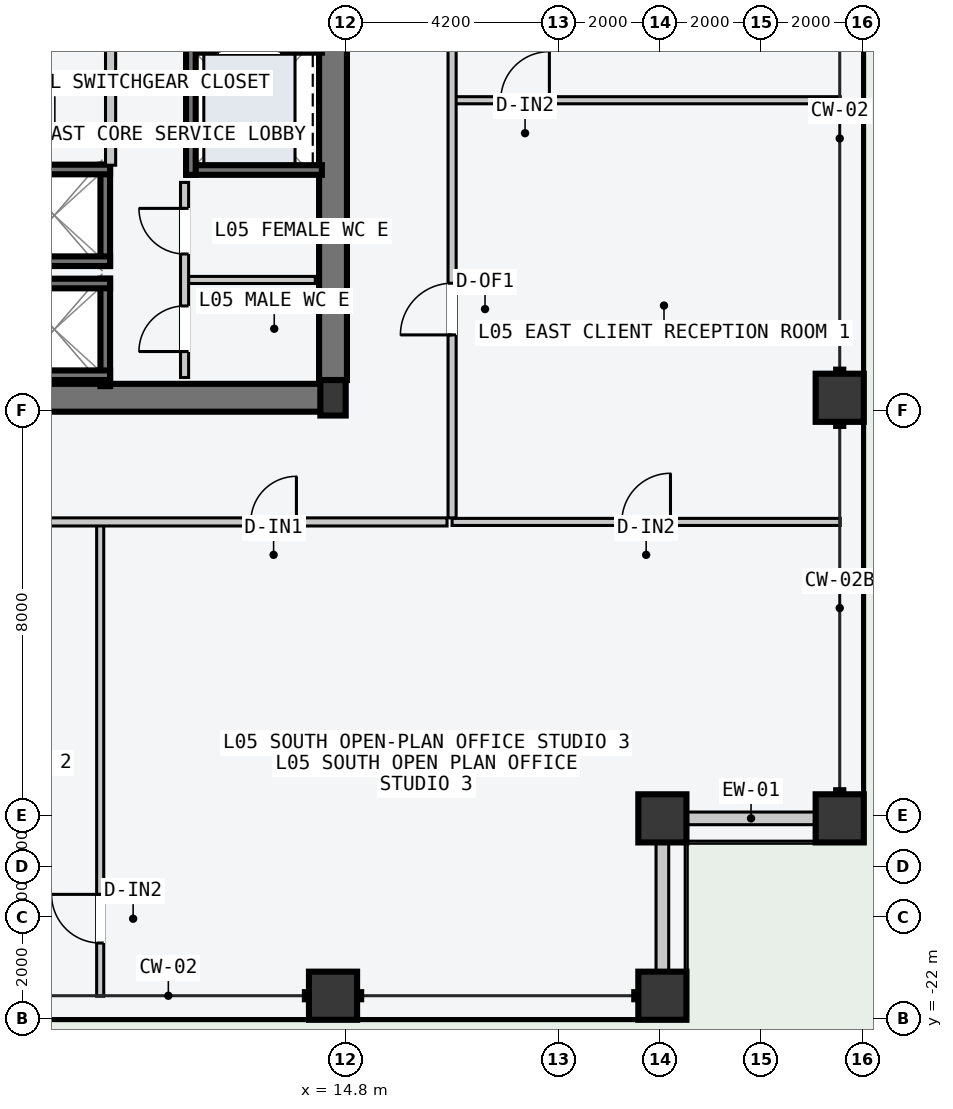
"""IFC4 building model, lengths in metres.
Left out: names, types, materials, properties, quantities, classifications, styles, units other than length and angle.
Written with IfcOpenShell. Run it as: python <this file> out.ifc"""

import sys

from ifc_helpers import new_model, si_unit, direction, frame, frame_2d, origin, origin_2d, place, context, subcontext, project, spatial, rectangle, hollow_rectangle, i_section, extrude, element, fill, save


model = new_model("IFC4")
c1 = context("Model", 3, precision=1e-05, world=origin(), true_north=direction((0.0, 1.0)))
c2 = subcontext(c1, "Body", "Model", "MODEL_VIEW")
j1 = project(units=[si_unit("LENGTHUNIT", "METRE"), si_unit("PLANEANGLEUNIT", "RADIAN")], contexts=[c1])
p1 = place(None, origin())
s1 = spatial("IfcSite", under=j1, at=p1, CompositionType="ELEMENT")
p2 = place(p1, origin())
s2 = spatial("IfcBuilding", under=s1, at=p2, CompositionType="ELEMENT")
p3 = place(p2, frame((0.0, 0.0, 24.0)))
s3 = spatial("IfcBuildingStorey", under=s2, at=p3, CompositionType="ELEMENT", Elevation=24.0)
p4 = place(p3, frame((8.07, -9.75, -0.2), z_axis=(0.0, 0.0, 1.0), x_axis=(1.0, 0.0, 0.0)))
e1 = element("IfcWall", 1, at=p4, inside=s3, PredefinedType="SHEAR", context=c2, shape_type="SweptSolid", body=[
    extrude(rectangle(XDim=6.46, YDim=0.55, at=frame_2d((3.23, 0.0))), origin(), (0.0, 0.0, 1.0), 3.6),
])
p5 = place(p3, frame((14.55, -9.4, -0.2), z_axis=(0.0, 0.0, 1.0), x_axis=(0.0, 1.0, 0.0)))
e2 = element("IfcWall", 2, at=p5, inside=s3, PredefinedType="SHEAR", context=c2, shape_type="SweptSolid", body=[
    extrude(rectangle(XDim=9.05, YDim=0.55, at=frame_2d((4.525, 0.0))), origin(), (0.0, 0.0, 1.0), 3.6),
])
p6 = place(p3, frame((14.55, -9.75, 0.0), z_axis=(0.0, 0.0, 1.0), x_axis=(1.0, 0.0, 0.0)))
e3 = element("IfcColumn", 3, at=p6, inside=s3, PredefinedType="COLUMN", context=c2, shape_type="SweptSolid", body=[
    extrude(i_section(OverallWidth=0.5, OverallDepth=0.7, WebThickness=0.028, FlangeThickness=0.045, at=origin_2d()), origin(), (0.0, 0.0, 1.0), 3.6),
])
for number, where, z_axis, x_axis in (
    (4, (14.55, -21.55, -0.2), (0.0, 0.0, 1.0), (1.0, 0.0, 0.0)),
    (5, (21.05, -21.55, -0.2), (0.0, 0.0, 1.0), (1.0, 0.0, 0.0)),
    (6, (24.55, -18.05, -0.2), (0.0, 0.0, 1.0), (0.0, 1.0, 0.0)),
    (7, (24.55, -9.75, -0.2), (0.0, 0.0, 1.0), (0.0, 1.0, 0.0)),
):
    element("IfcColumn", number, at=place(p3, frame(where, z_axis=z_axis, x_axis=x_axis)), inside=s3, PredefinedType="COLUMN", context=c2, shape_type="SweptSolid", body=[
        extrude(hollow_rectangle(XDim=0.95, YDim=0.95, WallThickness=0.048, at=origin_2d()), origin(), (0.0, 0.0, 1.0), 3.8),
    ])
p7 = place(p3, frame((21.05, -18.05, 0.0), z_axis=(0.0, 0.0, 1.0), x_axis=(1.0, 0.0, 0.0)))
e8 = element("IfcColumn", 8, at=p7, inside=s3, PredefinedType="COLUMN", context=c2, shape_type="SweptSolid", body=[
    extrude(hollow_rectangle(XDim=0.95, YDim=0.95, WallThickness=0.048, at=origin_2d()), origin(), (0.0, 0.0, 1.0), 3.6),
])
for number, where, z_axis, x_axis in (
    (9, (21.535, -18.05, 0.0), (0.0, 0.0, 1.0), (1.0, 0.0, 0.0)),
    (10, (21.05, -21.065, 0.0), (0.0, 0.0, 1.0), (0.0, 1.0, 0.0)),
):
    element("IfcWall", number, at=place(p3, frame(where, z_axis=z_axis, x_axis=x_axis)), inside=s3, PredefinedType="STANDARD", context=c2, shape_type="SweptSolid", body=[
        extrude(rectangle(XDim=2.53, YDim=0.25, at=frame_2d((1.265, 0.0))), origin(), (0.0, 0.0, 1.0), 2.7),
    ])
p8 = place(p3, frame((10.055, -9.52, -0.2), z_axis=(0.0, 0.0, 1.0), x_axis=(0.0, 1.0, 0.0)))
e11 = element("IfcWall", 11, at=p8, inside=s3, PredefinedType="SOLIDWALL", context=c2, shape_type="SweptSolid", body=[
    extrude(rectangle(XDim=2.12, YDim=0.19, at=frame_2d((1.06, 0.0))), origin(), (0.0, 0.0, 1.0), 3.6),
])
for number, where, z_axis, x_axis in (
    (12, (7.95, -7.495, -0.2), (0.0, 0.0, 1.0), (1.0, 0.0, 0.0)),
    (13, (7.95, -9.305, -0.2), (0.0, 0.0, 1.0), (1.0, 0.0, 0.0)),
):
    element("IfcWall", number, at=place(p3, frame(where, z_axis=z_axis, x_axis=x_axis)), inside=s3, PredefinedType="SOLIDWALL", context=c2, shape_type="SweptSolid", body=[
        extrude(rectangle(XDim=2.2, YDim=0.19, at=frame_2d((1.1, 0.0))), origin(), (0.0, 0.0, 1.0), 3.6),
    ])
p9 = place(p3, frame((10.055, -7.15, -0.2), z_axis=(0.0, 0.0, 1.0), x_axis=(0.0, 1.0, 0.0)))
e14 = element("IfcWall", 14, at=p9, inside=s3, PredefinedType="SOLIDWALL", context=c2, shape_type="SweptSolid", body=[
    extrude(rectangle(XDim=2.0, YDim=0.19, at=frame_2d((1.0, 0.0))), origin(), (0.0, 0.0, 1.0), 3.6),
])
for number, where, z_axis, x_axis in (
    (15, (7.95, -5.245, -0.2), (0.0, 0.0, 1.0), (1.0, 0.0, 0.0)),
    (16, (7.95, -7.055, -0.2), (0.0, 0.0, 1.0), (1.0, 0.0, 0.0)),
):
    element("IfcWall", number, at=place(p3, frame(where, z_axis=z_axis, x_axis=x_axis)), inside=s3, PredefinedType="SOLIDWALL", context=c2, shape_type="SweptSolid", body=[
        extrude(rectangle(XDim=2.2, YDim=0.19, at=frame_2d((1.1, 0.0))), origin(), (0.0, 0.0, 1.0), 3.6),
    ])
p10 = place(p3, frame((11.65, -2.845, -0.2), z_axis=(0.0, 0.0, 1.0), x_axis=(1.0, 0.0, 0.0)))
e17 = element("IfcWall", 17, at=p10, inside=s3, PredefinedType="SOLIDWALL", context=c2, shape_type="SweptSolid", body=[
    extrude(rectangle(XDim=2.68, YDim=0.19, at=frame_2d((1.34, 0.0))), origin(), (0.0, 0.0, 1.0), 3.6),
])
p11 = place(p10, frame((0.65, 0.0, 0.2)))
e18 = element("IfcOpeningElement", 18, at=p11, cuts=e17, PredefinedType="OPENING", context=c2, shape_type="SweptSolid", body=[
    extrude(rectangle(XDim=1.2, YDim=2.2, at=frame_2d((0.6, 1.1))), frame((0.0, 0.105, 0.0), z_axis=(0.0, -1.0, 0.0), x_axis=(1.0, 0.0, 0.0)), (0.0, 0.0, 1.0), 0.21),
])
p12 = place(p3, frame((11.65, -5.255, -0.2), z_axis=(0.0, 0.0, 1.0), x_axis=(1.0, 0.0, 0.0)))
e19 = element("IfcWall", 19, at=p12, inside=s3, PredefinedType="SOLIDWALL", context=c2, shape_type="SweptSolid", body=[
    extrude(rectangle(XDim=2.68, YDim=0.19, at=frame_2d((1.34, 0.0))), origin(), (0.0, 0.0, 1.0), 3.6),
])
p13 = place(p3, frame((11.745, -5.35, -0.2), z_axis=(0.0, 0.0, 1.0), x_axis=(0.0, 1.0, 0.0)))
e20 = element("IfcWall", 20, at=p13, inside=s3, PredefinedType="SOLIDWALL", context=c2, shape_type="SweptSolid", body=[
    extrude(rectangle(XDim=2.6, YDim=0.19, at=frame_2d((1.3, 0.0))), origin(), (0.0, 0.0, 1.0), 3.6),
])
p14 = place(p3, frame((10.16, -5.16, 0.0), z_axis=(0.0, 0.0, 1.0), x_axis=(0.0, 1.0, 0.0)))
e21 = element("IfcWall", 21, at=p14, inside=s3, PredefinedType="PARTITIONING", context=c2, shape_type="SweptSolid", body=[
    extrude(rectangle(XDim=2.44, YDim=0.2, at=frame_2d((1.22, 0.0))), origin(), (0.0, 0.0, 1.0), 3.4),
])
p15 = place(p3, frame((11.7, -7.425, 0.0), z_axis=(0.0, 0.0, 1.0), x_axis=(1.0, 0.0, 0.0)))
e22 = element("IfcWall", 22, at=p15, inside=s3, PredefinedType="PARTITIONING", context=c2, shape_type="SweptSolid", body=[
    extrude(rectangle(XDim=2.5, YDim=0.14, at=frame_2d((1.25, 0.0))), origin(), (0.0, 0.0, 1.0), 3.4),
])
p16 = place(p3, frame((11.62, -9.35, 0.0), z_axis=(0.0, 0.0, 1.0), x_axis=(0.0, 1.0, 0.0)))
e23 = element("IfcWall", 23, at=p16, inside=s3, PredefinedType="PARTITIONING", context=c2, shape_type="SweptSolid", body=[
    extrude(rectangle(XDim=3.85, YDim=0.16, at=frame_2d((1.925, 0.0))), origin(), (0.0, 0.0, 1.0), 3.4),
])
p17 = place(p16, frame((0.512, 0.0, 0.0)))
e24 = element("IfcOpeningElement", 24, at=p17, cuts=e23, PredefinedType="OPENING", context=c2, shape_type="SweptSolid", body=[
    extrude(rectangle(XDim=0.9, YDim=2.15, at=frame_2d((0.45, 1.075))), frame((0.0, 0.09, 0.0), z_axis=(0.0, -1.0, 0.0), x_axis=(1.0, 0.0, 0.0)), (0.0, 0.0, 1.0), 0.18),
])
p18 = place(p16, frame((2.438, 0.0, 0.0)))
e25 = element("IfcOpeningElement", 25, at=p18, cuts=e23, PredefinedType="OPENING", context=c2, shape_type="SweptSolid", body=[
    extrude(rectangle(XDim=0.9, YDim=2.15, at=frame_2d((0.45, 1.075))), frame((0.0, 0.09, 0.0), z_axis=(0.0, -1.0, 0.0), x_axis=(1.0, 0.0, 0.0)), (0.0, 0.0, 1.0), 0.18),
])
p19 = place(p3, frame((9.955, -21.56, 0.0), z_axis=(0.0, 0.0, 1.0), x_axis=(0.0, 1.0, 0.0)))
e26 = element("IfcWall", 26, at=p19, inside=s3, PredefinedType="PARTITIONING", context=c2, shape_type="SweptSolid", body=[
    extrude(rectangle(XDim=9.3, YDim=0.14, at=frame_2d((4.65, 0.0))), origin(), (0.0, 0.0, 1.0), 3.4),
])
p20 = place(p19, frame((1.05, 0.0, 0.0)))
e27 = element("IfcOpeningElement", 27, at=p20, cuts=e26, PredefinedType="OPENING", context=c2, shape_type="SweptSolid", body=[
    extrude(rectangle(XDim=0.96, YDim=2.18, at=frame_2d((0.48, 1.09))), frame((0.0, 0.08, 0.0), z_axis=(0.0, -1.0, 0.0), x_axis=(1.0, 0.0, 0.0)), (0.0, 0.0, 1.0), 0.16),
])
p21 = place(p3, frame((-16.8, -12.2, 0.0), z_axis=(0.0, 0.0, 1.0), x_axis=(1.0, 0.0, 0.0)))
e28 = element("IfcWall", 28, at=p21, inside=s3, PredefinedType="PARTITIONING", context=c2, shape_type="SweptSolid", body=[
    extrude(rectangle(XDim=33.6, YDim=0.16, at=frame_2d((16.8, 0.0))), origin(), (0.0, 0.0, 1.0), 3.4),
])
p22 = place(p21, frame((6.585, 0.0, 0.0)))
e29 = element("IfcOpeningElement", 29, at=p22, cuts=e28, PredefinedType="OPENING", context=c2, shape_type="SweptSolid", body=[
    extrude(rectangle(XDim=1.24, YDim=2.24, at=frame_2d((0.62, 1.12))), frame((0.0, 0.09, 0.0), z_axis=(0.0, -1.0, 0.0), x_axis=(1.0, 0.0, 0.0)), (0.0, 0.0, 1.0), 0.18),
])
p23 = place(p21, frame((19.883, 0.0, 0.0)))
e30 = element("IfcOpeningElement", 30, at=p23, cuts=e28, PredefinedType="OPENING", context=c2, shape_type="SweptSolid", body=[
    extrude(rectangle(XDim=1.4, YDim=2.2, at=frame_2d((0.7, 1.1))), frame((0.0, 0.09, 0.0), z_axis=(0.0, -1.0, 0.0), x_axis=(1.0, 0.0, 0.0)), (0.0, 0.0, 1.0), 0.18),
])
p24 = place(p21, frame((29.728, 0.0, 0.0)))
e31 = element("IfcOpeningElement", 31, at=p24, cuts=e28, PredefinedType="OPENING", context=c2, shape_type="SweptSolid", body=[
    extrude(rectangle(XDim=0.9, YDim=2.15, at=frame_2d((0.45, 1.075))), frame((0.0, 0.09, 0.0), z_axis=(0.0, -1.0, 0.0), x_axis=(1.0, 0.0, 0.0)), (0.0, 0.0, 1.0), 0.18),
])
p25 = place(p3, frame((16.9, -12.2, 0.0), z_axis=(0.0, 0.0, 1.0), x_axis=(1.0, 0.0, 0.0)))
e32 = element("IfcWall", 32, at=p25, inside=s3, PredefinedType="PARTITIONING", context=c2, shape_type="SweptSolid", body=[
    extrude(rectangle(XDim=7.66, YDim=0.14, at=frame_2d((3.83, 0.0))), origin(), (0.0, 0.0, 1.0), 3.4),
])
p26 = place(p25, frame((3.35, 0.0, 0.0)))
e33 = element("IfcOpeningElement", 33, at=p26, cuts=e32, PredefinedType="OPENING", context=c2, shape_type="SweptSolid", body=[
    extrude(rectangle(XDim=0.96, YDim=2.18, at=frame_2d((0.48, 1.09))), frame((0.0, 0.08, 0.0), z_axis=(0.0, -1.0, 0.0), x_axis=(1.0, 0.0, 0.0)), (0.0, 0.0, 1.0), 0.16),
])
p27 = place(p3, frame((16.96, -3.878, 0.0), z_axis=(0.0, 0.0, 1.0), x_axis=(1.0, 0.0, 0.0)))
e34 = element("IfcWall", 34, at=p27, inside=s3, PredefinedType="PARTITIONING", context=c2, shape_type="SweptSolid", body=[
    extrude(rectangle(XDim=7.6, YDim=0.14, at=frame_2d((3.8, 0.0))), origin(), (0.0, 0.0, 1.0), 3.4),
])
p28 = place(p27, frame((0.9, 0.0, 0.0)))
e35 = element("IfcOpeningElement", 35, at=p28, cuts=e34, PredefinedType="OPENING", context=c2, shape_type="SweptSolid", body=[
    extrude(rectangle(XDim=0.96, YDim=2.18, at=frame_2d((0.48, 1.09))), frame((0.0, 0.08, 0.0), z_axis=(0.0, -1.0, 0.0), x_axis=(1.0, 0.0, 0.0)), (0.0, 0.0, 1.0), 0.16),
])
p29 = place(p3, frame((16.9, -12.12, 0.0), z_axis=(0.0, 0.0, 1.0), x_axis=(0.0, 1.0, 0.0)))
e36 = element("IfcWall", 36, at=p29, inside=s3, PredefinedType="PARTITIONING", context=c2, shape_type="SweptSolid", body=[
    extrude(rectangle(XDim=24.24, YDim=0.16, at=frame_2d((12.12, 0.0))), origin(), (0.0, 0.0, 1.0), 3.4),
])
p30 = place(p29, frame((3.611, 0.0, 0.0)))
e37 = element("IfcOpeningElement", 37, at=p30, cuts=e36, PredefinedType="OPENING", context=c2, shape_type="SweptSolid", body=[
    extrude(rectangle(XDim=1.02, YDim=2.2, at=frame_2d((0.51, 1.1))), frame((0.0, 0.09, 0.0), z_axis=(0.0, -1.0, 0.0), x_axis=(1.0, 0.0, 0.0)), (0.0, 0.0, 1.0), 0.18),
])
p31 = place(p29, frame((15.711, 0.0, 0.0)))
e38 = element("IfcOpeningElement", 38, at=p31, cuts=e36, PredefinedType="OPENING", context=c2, shape_type="SweptSolid", body=[
    extrude(rectangle(XDim=1.06, YDim=2.2, at=frame_2d((0.53, 1.1))), frame((0.0, 0.09, 0.0), z_axis=(0.0, -1.0, 0.0), x_axis=(1.0, 0.0, 0.0)), (0.0, 0.0, 1.0), 0.18),
])
p32 = place(p17, origin())
e39 = element("IfcDoor", 39, at=p32, inside=s3, OperationType="SINGLE_SWING_LEFT", PredefinedType="DOOR", context=c2, shape_type="SweptSolid", body=[
    extrude(rectangle(XDim=0.9, YDim=2.15, at=frame_2d((0.45, 1.075))), frame((0.0, 0.025, 0.0), z_axis=(0.0, -1.0, 0.0), x_axis=(1.0, 0.0, 0.0)), (0.0, 0.0, 1.0), 0.05),
])
fill(e24, e39)
p33 = place(p18, origin())
e40 = element("IfcDoor", 40, at=p33, inside=s3, OperationType="SINGLE_SWING_RIGHT", PredefinedType="DOOR", context=c2, shape_type="SweptSolid", body=[
    extrude(rectangle(XDim=0.9, YDim=2.15, at=frame_2d((0.45, 1.075))), frame((0.0, 0.025, 0.0), z_axis=(0.0, -1.0, 0.0), x_axis=(1.0, 0.0, 0.0)), (0.0, 0.0, 1.0), 0.05),
])
fill(e25, e40)
p34 = place(p20, origin())
e41 = element("IfcDoor", 41, at=p34, inside=s3, OperationType="SINGLE_SWING_RIGHT", PredefinedType="DOOR", context=c2, shape_type="SweptSolid", body=[
    extrude(rectangle(XDim=0.96, YDim=2.18, at=frame_2d((0.48, 1.09))), frame((0.0, 0.025, 0.0), z_axis=(0.0, -1.0, 0.0), x_axis=(1.0, 0.0, 0.0)), (0.0, 0.0, 1.0), 0.05),
])
fill(e27, e41)
p35 = place(p24, origin())
e42 = element("IfcDoor", 42, at=p35, inside=s3, OperationType="SINGLE_SWING_RIGHT", PredefinedType="DOOR", context=c2, shape_type="SweptSolid", body=[
    extrude(rectangle(XDim=0.9, YDim=2.15, at=frame_2d((0.45, 1.075))), frame((0.0, 0.025, 0.0), z_axis=(0.0, -1.0, 0.0), x_axis=(1.0, 0.0, 0.0)), (0.0, 0.0, 1.0), 0.05),
])
fill(e31, e42)
p36 = place(p26, origin())
e43 = element("IfcDoor", 43, at=p36, inside=s3, OperationType="SINGLE_SWING_RIGHT", PredefinedType="DOOR", context=c2, shape_type="SweptSolid", body=[
    extrude(rectangle(XDim=0.96, YDim=2.18, at=frame_2d((0.48, 1.09))), frame((0.0, 0.025, 0.0), z_axis=(0.0, -1.0, 0.0), x_axis=(1.0, 0.0, 0.0)), (0.0, 0.0, 1.0), 0.05),
])
fill(e33, e43)
p37 = place(p28, origin())
e44 = element("IfcDoor", 44, at=p37, inside=s3, OperationType="SINGLE_SWING_RIGHT", PredefinedType="DOOR", context=c2, shape_type="SweptSolid", body=[
    extrude(rectangle(XDim=0.96, YDim=2.18, at=frame_2d((0.48, 1.09))), frame((0.0, 0.025, 0.0), z_axis=(0.0, -1.0, 0.0), x_axis=(1.0, 0.0, 0.0)), (0.0, 0.0, 1.0), 0.05),
])
fill(e35, e44)
p38 = place(p30, origin())
e45 = element("IfcDoor", 45, at=p38, inside=s3, OperationType="SINGLE_SWING_LEFT", PredefinedType="DOOR", context=c2, shape_type="SweptSolid", body=[
    extrude(rectangle(XDim=1.02, YDim=2.2, at=frame_2d((0.51, 1.1))), frame((0.0, 0.025, 0.0), z_axis=(0.0, -1.0, 0.0), x_axis=(1.0, 0.0, 0.0)), (0.0, 0.0, 1.0), 0.05),
])
fill(e37, e45)
save(model, sys.argv[1])
